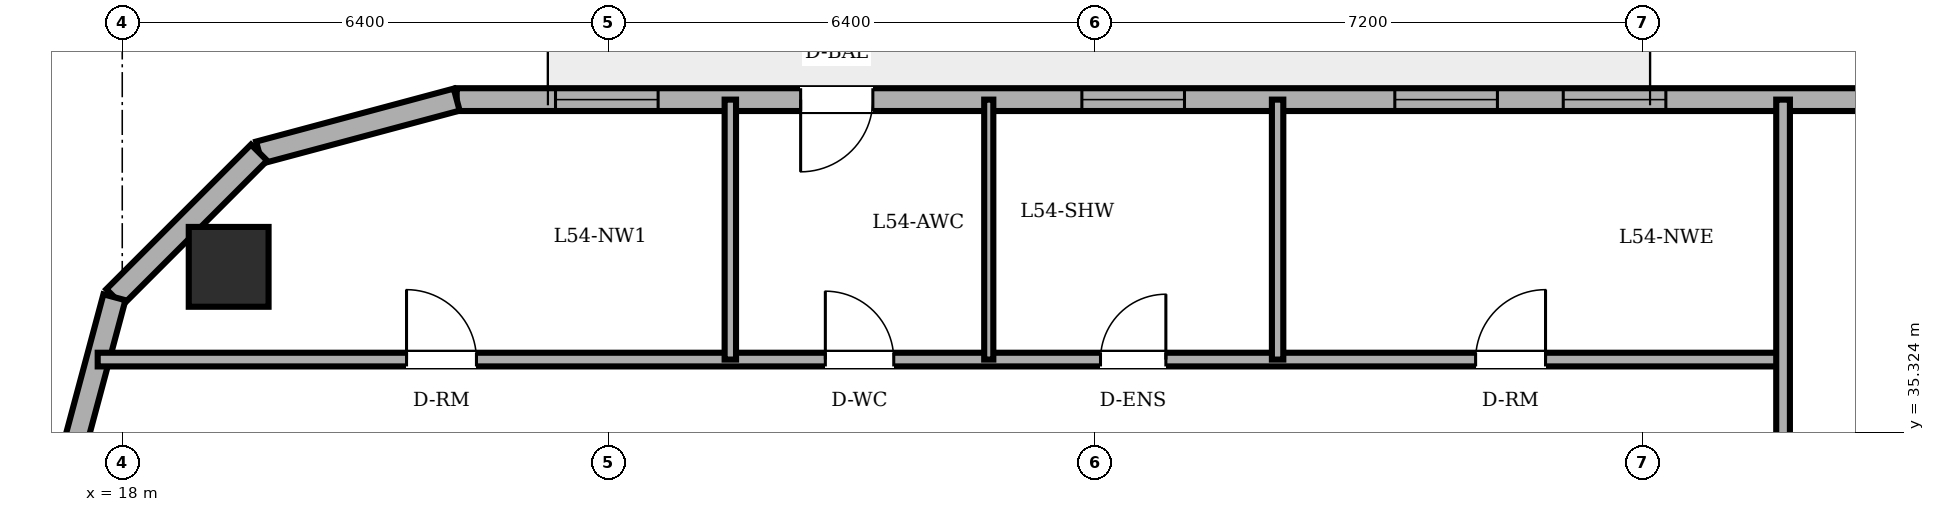
"""IFC4 building model, lengths in metres.
Left out: names, types, materials, properties, quantities, classifications, styles, units other than length and angle.
Written with IfcOpenShell. Run it as: python <this file> out.ifc"""

import sys

from ifc_helpers import new_model, si_unit, direction, frame, frame_2d, origin, origin_2d, place, context, subcontext, project, spatial, rectangle, circle, extrude, element, fill, save


model = new_model("IFC4")
c1 = context("Model", 3, precision=1e-05, world=origin(), true_north=direction((0.0, 1.0)))
c2 = subcontext(c1, "Body", "Model", "MODEL_VIEW")
j1 = project(units=[si_unit("LENGTHUNIT", "METRE"), si_unit("PLANEANGLEUNIT", "RADIAN")], contexts=[c1])
p1 = place(None, origin())
s1 = spatial("IfcSite", under=j1, at=p1, CompositionType="ELEMENT")
p2 = place(p1, origin())
s2 = spatial("IfcBuilding", under=s1, at=p2, CompositionType="ELEMENT")
p3 = place(p2, frame((0.0, 0.0, 208.5)))
s3 = spatial("IfcBuildingStorey", under=s2, at=p3, CompositionType="ELEMENT", Elevation=208.5)
p4 = place(p3, frame((19.4, 37.5, 0.0), z_axis=(0.0, 0.0, 1.0), x_axis=(1.0, 0.0, 0.0)))
e1 = element("IfcColumn", 1, at=p4, inside=s3, PredefinedType="COLUMN", context=c2, shape_type="SweptSolid", body=[
    extrude(circle(Radius=0.525, at=origin_2d()), origin(), (0.0, 0.0, 1.0), 3.6),
])
p5 = place(p3, frame((54.885, 39.7, 0.0), z_axis=(0.0, 0.0, 1.0), x_axis=(-1.0, 0.0, 0.0)))
e2 = element("IfcWall", 2, at=p5, inside=s3, PredefinedType="SOLIDWALL", context=c2, shape_type="SweptSolid", body=[
    extrude(rectangle(XDim=32.485, YDim=0.3, at=frame_2d((16.243, 0.0))), origin(), (0.0, 0.0, 1.0), 3.4),
])
p6 = place(p5, frame((27.01, 0.0, 0.0)))
e3 = element("IfcOpeningElement", 3, at=p6, cuts=e2, PredefinedType="OPENING", context=c2, shape_type="SweptSolid", body=[
    extrude(rectangle(XDim=0.95, YDim=2.2, at=frame_2d((0.475, 1.1))), frame((0.0, 0.16, 0.0), z_axis=(0.0, -1.0, 0.0), x_axis=(1.0, 0.0, 0.0)), (0.0, 0.0, 1.0), 0.32),
])
p7 = place(p5, frame((5.846, 0.0, 0.85)))
e4 = element("IfcOpeningElement", 4, at=p7, cuts=e2, PredefinedType="OPENING", context=c2, shape_type="SweptSolid", body=[
    extrude(rectangle(XDim=1.35, YDim=1.55, at=frame_2d((0.675, 0.775))), frame((0.0, 0.16, 0.0), z_axis=(0.0, -1.0, 0.0), x_axis=(1.0, 0.0, 0.0)), (0.0, 0.0, 1.0), 0.32),
])
p8 = place(p5, frame((10.103, 0.0, 0.85)))
e5 = element("IfcOpeningElement", 5, at=p8, cuts=e2, PredefinedType="OPENING", context=c2, shape_type="SweptSolid", body=[
    extrude(rectangle(XDim=1.35, YDim=1.55, at=frame_2d((0.675, 0.775))), frame((0.0, 0.16, 0.0), z_axis=(0.0, -1.0, 0.0), x_axis=(1.0, 0.0, 0.0)), (0.0, 0.0, 1.0), 0.32),
])
p9 = place(p5, frame((16.577, 0.0, 0.85)))
e6 = element("IfcOpeningElement", 6, at=p9, cuts=e2, PredefinedType="OPENING", context=c2, shape_type="SweptSolid", body=[
    extrude(rectangle(XDim=1.35, YDim=1.55, at=frame_2d((0.675, 0.775))), frame((0.0, 0.16, 0.0), z_axis=(0.0, -1.0, 0.0), x_axis=(1.0, 0.0, 0.0)), (0.0, 0.0, 1.0), 0.32),
])
p10 = place(p5, frame((18.793, 0.0, 0.85)))
e7 = element("IfcOpeningElement", 7, at=p10, cuts=e2, PredefinedType="OPENING", context=c2, shape_type="SweptSolid", body=[
    extrude(rectangle(XDim=1.35, YDim=1.55, at=frame_2d((0.675, 0.775))), frame((0.0, 0.16, 0.0), z_axis=(0.0, -1.0, 0.0), x_axis=(1.0, 0.0, 0.0)), (0.0, 0.0, 1.0), 0.32),
])
p11 = place(p5, frame((22.91, 0.0, 0.85)))
e8 = element("IfcOpeningElement", 8, at=p11, cuts=e2, PredefinedType="OPENING", context=c2, shape_type="SweptSolid", body=[
    extrude(rectangle(XDim=1.35, YDim=1.55, at=frame_2d((0.675, 0.775))), frame((0.0, 0.16, 0.0), z_axis=(0.0, -1.0, 0.0), x_axis=(1.0, 0.0, 0.0)), (0.0, 0.0, 1.0), 0.32),
])
p12 = place(p5, frame((29.835, 0.0, 0.85)))
e9 = element("IfcOpeningElement", 9, at=p12, cuts=e2, PredefinedType="OPENING", context=c2, shape_type="SweptSolid", body=[
    extrude(rectangle(XDim=1.35, YDim=1.55, at=frame_2d((0.675, 0.775))), frame((0.0, 0.16, 0.0), z_axis=(0.0, -1.0, 0.0), x_axis=(1.0, 0.0, 0.0)), (0.0, 0.0, 1.0), 0.32),
])
p13 = place(p3, frame((22.4, 39.7, 0.0), z_axis=(0.0, 0.0, 1.0), x_axis=(-0.965889330541, -0.258955210695, 0.0)))
e10 = element("IfcWall", 10, at=p13, inside=s3, PredefinedType="SOLIDWALL", context=c2, shape_type="SweptSolid", body=[
    extrude(rectangle(XDim=2.692, YDim=0.3, at=frame_2d((1.346, 0.0))), origin(), (0.0, 0.0, 1.0), 3.4),
])
p14 = place(p3, frame((19.8, 39.003, 0.0), z_axis=(0.0, 0.0, 1.0), x_axis=(-0.707152139074, -0.70706142039, 0.0)))
e11 = element("IfcWall", 11, at=p14, inside=s3, PredefinedType="SOLIDWALL", context=c2, shape_type="SweptSolid", body=[
    extrude(rectangle(XDim=2.691, YDim=0.3, at=frame_2d((1.346, 0.0))), origin(), (0.0, 0.0, 1.0), 3.4),
])
p15 = place(p3, frame((17.897, 37.1, 0.0), z_axis=(0.0, 0.0, 1.0), x_axis=(-0.258932525951, -0.965895412042, 0.0)))
e12 = element("IfcWall", 12, at=p15, inside=s3, PredefinedType="SOLIDWALL", context=c2, shape_type="SweptSolid", body=[
    extrude(rectangle(XDim=2.692, YDim=0.3, at=frame_2d((1.346, 0.0))), origin(), (0.0, 0.0, 1.0), 3.4),
])
p16 = place(p3, frame((17.677, 36.28, 0.0), z_axis=(0.0, 0.0, 1.0), x_axis=(1.0, 0.0, 0.0)))
e13 = element("IfcWall", 13, at=p16, inside=s3, PredefinedType="PARTITIONING", context=c2, shape_type="SweptSolid", body=[
    extrude(rectangle(XDim=22.173, YDim=0.18, at=frame_2d((11.086, 0.0))), origin(), (0.0, 0.0, 1.0), 3.4),
])
p17 = place(p16, frame((9.573, 0.0, 0.0)))
e14 = element("IfcOpeningElement", 14, at=p17, cuts=e13, PredefinedType="OPENING", context=c2, shape_type="SweptSolid", body=[
    extrude(rectangle(XDim=0.9, YDim=2.1, at=frame_2d((0.45, 1.05))), frame((0.0, 0.1, 0.0), z_axis=(0.0, -1.0, 0.0), x_axis=(1.0, 0.0, 0.0)), (0.0, 0.0, 1.0), 0.2),
])
p18 = place(p16, frame((13.193, 0.0, 0.0)))
e15 = element("IfcOpeningElement", 15, at=p18, cuts=e13, PredefinedType="OPENING", context=c2, shape_type="SweptSolid", body=[
    extrude(rectangle(XDim=0.86, YDim=2.1, at=frame_2d((0.43, 1.05))), frame((0.0, 0.1, 0.0), z_axis=(0.0, -1.0, 0.0), x_axis=(1.0, 0.0, 0.0)), (0.0, 0.0, 1.0), 0.2),
])
p19 = place(p16, frame((4.063, 0.0, 0.0)))
e16 = element("IfcOpeningElement", 16, at=p19, cuts=e13, PredefinedType="OPENING", context=c2, shape_type="SweptSolid", body=[
    extrude(rectangle(XDim=0.92, YDim=2.1, at=frame_2d((0.46, 1.05))), frame((0.0, 0.1, 0.0), z_axis=(0.0, -1.0, 0.0), x_axis=(1.0, 0.0, 0.0)), (0.0, 0.0, 1.0), 0.2),
])
p20 = place(p16, frame((18.128, 0.0, 0.0)))
e17 = element("IfcOpeningElement", 17, at=p20, cuts=e13, PredefinedType="OPENING", context=c2, shape_type="SweptSolid", body=[
    extrude(rectangle(XDim=0.92, YDim=2.1, at=frame_2d((0.46, 1.05))), frame((0.0, 0.1, 0.0), z_axis=(0.0, -1.0, 0.0), x_axis=(1.0, 0.0, 0.0)), (0.0, 0.0, 1.0), 0.2),
])
p21 = place(p3, frame((26.0, 36.28, 0.0), z_axis=(0.0, 0.0, 1.0), x_axis=(0.0, 1.0, 0.0)))
e18 = element("IfcWall", 18, at=p21, inside=s3, PredefinedType="PARTITIONING", context=c2, shape_type="SweptSolid", body=[
    extrude(rectangle(XDim=3.42, YDim=0.15, at=frame_2d((1.71, 0.0))), origin(), (0.0, 0.0, 1.0), 3.4),
])
p22 = place(p3, frame((29.4, 36.28, 0.0), z_axis=(0.0, 0.0, 1.0), x_axis=(0.0, 1.0, 0.0)))
e19 = element("IfcWall", 19, at=p22, inside=s3, PredefinedType="PARTITIONING", context=c2, shape_type="SweptSolid", body=[
    extrude(rectangle(XDim=3.42, YDim=0.12, at=frame_2d((1.71, 0.0))), origin(), (0.0, 0.0, 1.0), 3.4),
])
p23 = place(p3, frame((33.2, 36.28, 0.0), z_axis=(0.0, 0.0, 1.0), x_axis=(0.0, 1.0, 0.0)))
e20 = element("IfcWall", 20, at=p23, inside=s3, PredefinedType="PARTITIONING", context=c2, shape_type="SweptSolid", body=[
    extrude(rectangle(XDim=3.42, YDim=0.15, at=frame_2d((1.71, 0.0))), origin(), (0.0, 0.0, 1.0), 3.4),
])
p24 = place(p3, frame((39.85, 25.18, 0.0), z_axis=(0.0, 0.0, 1.0), x_axis=(0.0, 1.0, 0.0)))
e21 = element("IfcWall", 21, at=p24, inside=s3, PredefinedType="PARTITIONING", context=c2, shape_type="SweptSolid", body=[
    extrude(rectangle(XDim=14.52, YDim=0.18, at=frame_2d((7.26, 0.0))), origin(), (0.0, 0.0, 1.0), 3.4),
])
p25 = place(p6, origin())
e22 = element("IfcDoor", 22, at=p25, inside=s3, OperationType="SINGLE_SWING_RIGHT", PredefinedType="DOOR", context=c2, shape_type="SweptSolid", body=[
    extrude(rectangle(XDim=0.95, YDim=2.2, at=frame_2d((0.475, 1.1))), frame((0.0, 0.025, 0.0), z_axis=(0.0, -1.0, 0.0), x_axis=(1.0, 0.0, 0.0)), (0.0, 0.0, 1.0), 0.05),
])
fill(e3, e22)
p26 = place(p9, origin())
e23 = element("IfcWindow", 23, at=p26, inside=s3, PartitioningType="SINGLE_PANEL", PredefinedType="WINDOW", context=c2, shape_type="SweptSolid", body=[
    extrude(rectangle(XDim=1.35, YDim=1.55, at=frame_2d((0.675, 0.775))), frame((0.0, 0.03, 0.0), z_axis=(0.0, -1.0, 0.0), x_axis=(1.0, 0.0, 0.0)), (0.0, 0.0, 1.0), 0.06),
])
fill(e6, e23)
p27 = place(p10, origin())
e24 = element("IfcWindow", 24, at=p27, inside=s3, PartitioningType="SINGLE_PANEL", PredefinedType="WINDOW", context=c2, shape_type="SweptSolid", body=[
    extrude(rectangle(XDim=1.35, YDim=1.55, at=frame_2d((0.675, 0.775))), frame((0.0, 0.03, 0.0), z_axis=(0.0, -1.0, 0.0), x_axis=(1.0, 0.0, 0.0)), (0.0, 0.0, 1.0), 0.06),
])
fill(e7, e24)
p28 = place(p11, origin())
e25 = element("IfcWindow", 25, at=p28, inside=s3, PartitioningType="SINGLE_PANEL", PredefinedType="WINDOW", context=c2, shape_type="SweptSolid", body=[
    extrude(rectangle(XDim=1.35, YDim=1.55, at=frame_2d((0.675, 0.775))), frame((0.0, 0.03, 0.0), z_axis=(0.0, -1.0, 0.0), x_axis=(1.0, 0.0, 0.0)), (0.0, 0.0, 1.0), 0.06),
])
fill(e8, e25)
p29 = place(p12, origin())
e26 = element("IfcWindow", 26, at=p29, inside=s3, PartitioningType="SINGLE_PANEL", PredefinedType="WINDOW", context=c2, shape_type="SweptSolid", body=[
    extrude(rectangle(XDim=1.35, YDim=1.55, at=frame_2d((0.675, 0.775))), frame((0.0, 0.03, 0.0), z_axis=(0.0, -1.0, 0.0), x_axis=(1.0, 0.0, 0.0)), (0.0, 0.0, 1.0), 0.06),
])
fill(e9, e26)
p30 = place(p17, origin())
e27 = element("IfcDoor", 27, at=p30, inside=s3, OperationType="SINGLE_SWING_LEFT", PredefinedType="DOOR", context=c2, shape_type="SweptSolid", body=[
    extrude(rectangle(XDim=0.9, YDim=2.1, at=frame_2d((0.45, 1.05))), frame((0.0, 0.025, 0.0), z_axis=(0.0, -1.0, 0.0), x_axis=(1.0, 0.0, 0.0)), (0.0, 0.0, 1.0), 0.05),
])
fill(e14, e27)
p31 = place(p18, origin())
e28 = element("IfcDoor", 28, at=p31, inside=s3, OperationType="SINGLE_SWING_RIGHT", PredefinedType="DOOR", context=c2, shape_type="SweptSolid", body=[
    extrude(rectangle(XDim=0.86, YDim=2.1, at=frame_2d((0.43, 1.05))), frame((0.0, 0.025, 0.0), z_axis=(0.0, -1.0, 0.0), x_axis=(1.0, 0.0, 0.0)), (0.0, 0.0, 1.0), 0.05),
])
fill(e15, e28)
p32 = place(p19, origin())
e29 = element("IfcDoor", 29, at=p32, inside=s3, OperationType="SINGLE_SWING_LEFT", PredefinedType="DOOR", context=c2, shape_type="SweptSolid", body=[
    extrude(rectangle(XDim=0.92, YDim=2.1, at=frame_2d((0.46, 1.05))), frame((0.0, 0.025, 0.0), z_axis=(0.0, -1.0, 0.0), x_axis=(1.0, 0.0, 0.0)), (0.0, 0.0, 1.0), 0.05),
])
fill(e16, e29)
p33 = place(p20, origin())
e30 = element("IfcDoor", 30, at=p33, inside=s3, OperationType="SINGLE_SWING_RIGHT", PredefinedType="DOOR", context=c2, shape_type="SweptSolid", body=[
    extrude(rectangle(XDim=0.92, YDim=2.1, at=frame_2d((0.46, 1.05))), frame((0.0, 0.025, 0.0), z_axis=(0.0, -1.0, 0.0), x_axis=(1.0, 0.0, 0.0)), (0.0, 0.0, 1.0), 0.05),
])
fill(e17, e30)
save(model, sys.argv[1])
